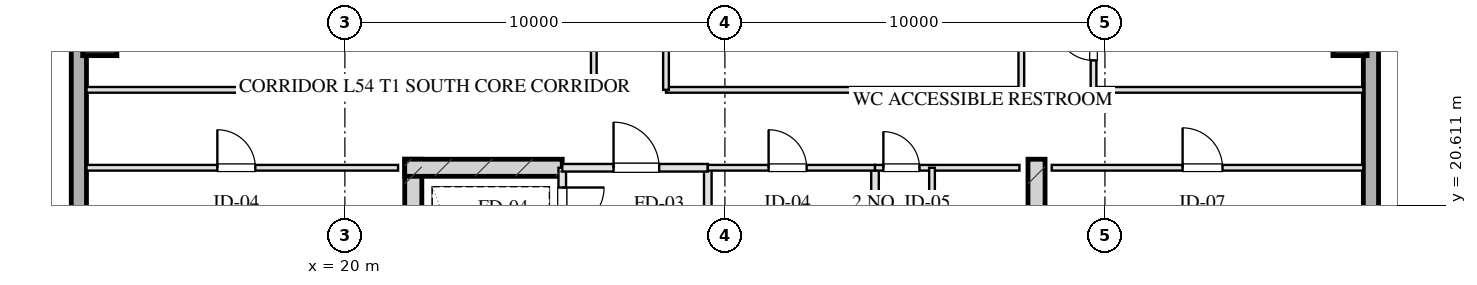
"""IFC4 building model, lengths in metres.
Left out: names, types, materials, properties, quantities, classifications, styles, units other than length and angle.
Written with IfcOpenShell. Run it as: python <this file> out.ifc"""

import sys

from ifc_helpers import new_model, si_unit, direction, frame, frame_2d, origin, origin_2d, place, context, subcontext, project, spatial, rectangle, hollow_rectangle, extrude, element, fill, save


model = new_model("IFC4")
c1 = context("Model", 3, precision=1e-05, world=origin(), true_north=direction((0.0, 1.0)))
c2 = subcontext(c1, "Body", "Model", "MODEL_VIEW")
j1 = project(units=[si_unit("LENGTHUNIT", "METRE"), si_unit("PLANEANGLEUNIT", "RADIAN")], contexts=[c1])
p1 = place(None, origin())
s1 = spatial("IfcSite", under=j1, at=p1, CompositionType="ELEMENT")
p2 = place(p1, origin())
s2 = spatial("IfcBuilding", under=s1, at=p2, CompositionType="ELEMENT")
p3 = place(p2, frame((0.0, 0.0, 202.4)))
s3 = spatial("IfcBuildingStorey", under=s2, at=p3, CompositionType="ELEMENT", Elevation=202.4)
for number, where, z_axis, x_axis in (
    (1, (21.8, 21.825, 0.0), (0.0, 0.0, 1.0), (0.0, -1.0, 0.0)),
    (2, (38.2, 21.825, 0.0), (0.0, 0.0, 1.0), (0.0, -1.0, 0.0)),
):
    element("IfcWall", number, at=place(p3, frame(where, z_axis=z_axis, x_axis=x_axis)), inside=s3, PredefinedType="SHEAR", context=c2, shape_type="SweptSolid", body=[
        extrude(rectangle(XDim=9.33, YDim=0.45, at=frame_2d((4.665, 0.0))), origin(), (0.0, 0.0, 1.0), 3.45),
    ])
p4 = place(p3, frame((21.575, 21.6, 0.0), z_axis=(0.0, 0.0, 1.0), x_axis=(1.0, 0.0, 0.0)))
e3 = element("IfcWall", 3, at=p4, inside=s3, PredefinedType="SHEAR", context=c2, shape_type="SweptSolid", body=[
    extrude(rectangle(XDim=4.145, YDim=0.45, at=frame_2d((2.073, 0.0))), origin(), (0.0, 0.0, 1.0), 3.45),
])
for number, where, z_axis, x_axis in (
    (4, (13.55, 25.0, 0.0), (0.0, 0.0, 1.0), (1.0, 0.0, 0.0)),
    (5, (46.45, 25.0, 0.0), (0.0, 0.0, 1.0), (1.0, 0.0, 0.0)),
):
    element("IfcColumn", number, at=place(p3, frame(where, z_axis=z_axis, x_axis=x_axis)), inside=s3, PredefinedType="COLUMN", context=c2, shape_type="SweptSolid", body=[
        extrude(hollow_rectangle(XDim=0.9, YDim=0.9, WallThickness=0.032, at=origin_2d()), origin(), (0.0, 0.0, 1.0), 3.451),
    ])
p5 = place(p3, frame((13.0, 10.8, 0.0), z_axis=(0.0, 0.0, 1.0), x_axis=(0.0, 1.0, 0.0)))
e6 = element("IfcWall", 6, at=p5, inside=s3, PredefinedType="SOLIDWALL", context=c2, shape_type="SweptSolid", body=[
    extrude(rectangle(XDim=46.4, YDim=0.4, at=frame_2d((23.2, 0.0))), origin(), (0.0, 0.0, 1.0), 2.61),
])
p6 = place(p5, frame((15.75, 0.0, 0.75)))
e7 = element("IfcOpeningElement", 7, at=p6, cuts=e6, PredefinedType="OPENING", context=c2, shape_type="SweptSolid", body=[
    extrude(rectangle(XDim=2.1, YDim=1.46, at=frame_2d((1.05, 0.73))), frame((0.0, 0.21, 0.0), z_axis=(0.0, -1.0, 0.0), x_axis=(1.0, 0.0, 0.0)), (0.0, 0.0, 1.0), 0.42),
])
p7 = place(p5, frame((19.55, 0.0, 0.75)))
e8 = element("IfcOpeningElement", 8, at=p7, cuts=e6, PredefinedType="OPENING", context=c2, shape_type="SweptSolid", body=[
    extrude(rectangle(XDim=2.1, YDim=1.46, at=frame_2d((1.05, 0.73))), frame((0.0, 0.21, 0.0), z_axis=(0.0, -1.0, 0.0), x_axis=(1.0, 0.0, 0.0)), (0.0, 0.0, 1.0), 0.42),
])
p8 = place(p5, frame((24.75, 0.0, 0.75)))
e9 = element("IfcOpeningElement", 9, at=p8, cuts=e6, PredefinedType="OPENING", context=c2, shape_type="SweptSolid", body=[
    extrude(rectangle(XDim=2.1, YDim=1.46, at=frame_2d((1.05, 0.73))), frame((0.0, 0.21, 0.0), z_axis=(0.0, -1.0, 0.0), x_axis=(1.0, 0.0, 0.0)), (0.0, 0.0, 1.0), 0.42),
])
p9 = place(p5, frame((28.55, 0.0, 0.75)))
e10 = element("IfcOpeningElement", 10, at=p9, cuts=e6, PredefinedType="OPENING", context=c2, shape_type="SweptSolid", body=[
    extrude(rectangle(XDim=2.1, YDim=1.46, at=frame_2d((1.05, 0.73))), frame((0.0, 0.21, 0.0), z_axis=(0.0, -1.0, 0.0), x_axis=(1.0, 0.0, 0.0)), (0.0, 0.0, 1.0), 0.42),
])
p10 = place(p3, frame((47.0, 57.2, 0.0), z_axis=(0.0, 0.0, 1.0), x_axis=(0.0, -1.0, 0.0)))
e11 = element("IfcWall", 11, at=p10, inside=s3, PredefinedType="SOLIDWALL", context=c2, shape_type="SweptSolid", body=[
    extrude(rectangle(XDim=46.4, YDim=0.4, at=frame_2d((23.2, 0.0))), origin(), (0.0, 0.0, 1.0), 2.61),
])
p11 = place(p10, frame((28.55, 0.0, 0.75)))
e12 = element("IfcOpeningElement", 12, at=p11, cuts=e11, PredefinedType="OPENING", context=c2, shape_type="SweptSolid", body=[
    extrude(rectangle(XDim=2.1, YDim=1.46, at=frame_2d((1.05, 0.73))), frame((0.0, 0.21, 0.0), z_axis=(0.0, -1.0, 0.0), x_axis=(1.0, 0.0, 0.0)), (0.0, 0.0, 1.0), 0.42),
])
p12 = place(p10, frame((24.75, 0.0, 0.75)))
e13 = element("IfcOpeningElement", 13, at=p12, cuts=e11, PredefinedType="OPENING", context=c2, shape_type="SweptSolid", body=[
    extrude(rectangle(XDim=2.1, YDim=1.46, at=frame_2d((1.05, 0.73))), frame((0.0, 0.21, 0.0), z_axis=(0.0, -1.0, 0.0), x_axis=(1.0, 0.0, 0.0)), (0.0, 0.0, 1.0), 0.42),
])
p13 = place(p10, frame((19.55, 0.0, 0.75)))
e14 = element("IfcOpeningElement", 14, at=p13, cuts=e11, PredefinedType="OPENING", context=c2, shape_type="SweptSolid", body=[
    extrude(rectangle(XDim=2.1, YDim=1.46, at=frame_2d((1.05, 0.73))), frame((0.0, 0.21, 0.0), z_axis=(0.0, -1.0, 0.0), x_axis=(1.0, 0.0, 0.0)), (0.0, 0.0, 1.0), 0.42),
])
p14 = place(p10, frame((15.75, 0.0, 0.75)))
e15 = element("IfcOpeningElement", 15, at=p14, cuts=e11, PredefinedType="OPENING", context=c2, shape_type="SweptSolid", body=[
    extrude(rectangle(XDim=2.1, YDim=1.46, at=frame_2d((1.05, 0.73))), frame((0.0, 0.21, 0.0), z_axis=(0.0, -1.0, 0.0), x_axis=(1.0, 0.0, 0.0)), (0.0, 0.0, 1.0), 0.42),
])
p15 = place(p3, frame((25.72, 21.6, 0.0), z_axis=(0.0, 0.0, 1.0), x_axis=(0.0, -1.0, 0.0)))
e16 = element("IfcWall", 16, at=p15, inside=s3, PredefinedType="PARTITIONING", context=c2, shape_type="SweptSolid", body=[
    extrude(rectangle(XDim=1.9, YDim=0.2, at=frame_2d((0.95, 0.0))), origin(), (0.0, 0.0, 1.0), 3.175),
])
p16 = place(p15, frame((0.52, 0.0, 0.0)))
e17 = element("IfcOpeningElement", 17, at=p16, cuts=e16, PredefinedType="OPENING", context=c2, shape_type="SweptSolid", body=[
    extrude(rectangle(XDim=1.1, YDim=2.05, at=frame_2d((0.55, 1.025))), frame((0.0, 0.11, 0.0), z_axis=(0.0, -1.0, 0.0), x_axis=(1.0, 0.0, 0.0)), (0.0, 0.0, 1.0), 0.22),
])
p17 = place(p3, frame((29.55, 21.6, 0.0), z_axis=(0.0, 0.0, 1.0), x_axis=(0.0, -1.0, 0.0)))
e18 = element("IfcWall", 18, at=p17, inside=s3, PredefinedType="PARTITIONING", context=c2, shape_type="SweptSolid", body=[
    extrude(rectangle(XDim=8.43, YDim=0.2, at=frame_2d((4.215, 0.0))), origin(), (0.0, 0.0, 1.0), 3.175),
])
p18 = place(p3, frame((25.72, 21.6, 0.0), z_axis=(0.0, 0.0, 1.0), x_axis=(1.0, 0.0, 0.0)))
e19 = element("IfcWall", 19, at=p18, inside=s3, PredefinedType="PARTITIONING", context=c2, shape_type="SweptSolid", body=[
    extrude(rectangle(XDim=3.83, YDim=0.2, at=frame_2d((1.915, 0.0))), origin(), (0.0, 0.0, 1.0), 3.175),
])
p19 = place(p18, frame((1.35, 0.0, 0.0)))
e20 = element("IfcOpeningElement", 20, at=p19, cuts=e19, PredefinedType="OPENING", context=c2, shape_type="SweptSolid", body=[
    extrude(rectangle(XDim=1.2, YDim=2.05, at=frame_2d((0.6, 1.025))), frame((0.0, 0.11, 0.0), z_axis=(0.0, -1.0, 0.0), x_axis=(1.0, 0.0, 0.0)), (0.0, 0.0, 1.0), 0.22),
])
p20 = place(p3, frame((33.95, 21.6, 0.0), z_axis=(0.0, 0.0, 1.0), x_axis=(0.0, -1.0, 0.0)))
e21 = element("IfcWall", 21, at=p20, inside=s3, PredefinedType="PARTITIONING", context=c2, shape_type="SweptSolid", body=[
    extrude(rectangle(XDim=8.43, YDim=0.2, at=frame_2d((4.215, 0.0))), origin(), (0.0, 0.0, 1.0), 3.175),
])
p21 = place(p3, frame((29.55, 21.6, 0.0), z_axis=(0.0, 0.0, 1.0), x_axis=(1.0, 0.0, 0.0)))
e22 = element("IfcWall", 22, at=p21, inside=s3, PredefinedType="PARTITIONING", context=c2, shape_type="SweptSolid", body=[
    extrude(rectangle(XDim=4.4, YDim=0.15, at=frame_2d((2.2, 0.0))), origin(), (0.0, 0.0, 1.0), 3.175),
])
p22 = place(p21, frame((1.6, 0.0, 0.0)))
e23 = element("IfcOpeningElement", 23, at=p22, cuts=e22, PredefinedType="OPENING", context=c2, shape_type="SweptSolid", body=[
    extrude(rectangle(XDim=1.0, YDim=2.05, at=frame_2d((0.5, 1.025))), frame((0.0, 0.085, 0.0), z_axis=(0.0, -1.0, 0.0), x_axis=(1.0, 0.0, 0.0)), (0.0, 0.0, 1.0), 0.17),
])
p23 = place(p3, frame((33.95, 21.6, 0.0), z_axis=(0.0, 0.0, 1.0), x_axis=(1.0, 0.0, 0.0)))
e24 = element("IfcWall", 24, at=p23, inside=s3, PredefinedType="PARTITIONING", context=c2, shape_type="SweptSolid", body=[
    extrude(rectangle(XDim=3.8, YDim=0.15, at=frame_2d((1.9, 0.0))), origin(), (0.0, 0.0, 1.0), 3.175),
])
p24 = place(p23, frame((0.22, 0.0, 0.0)))
e25 = element("IfcOpeningElement", 25, at=p24, cuts=e24, PredefinedType="OPENING", context=c2, shape_type="SweptSolid", body=[
    extrude(rectangle(XDim=0.95, YDim=2.05, at=frame_2d((0.475, 1.025))), frame((0.0, 0.085, 0.0), z_axis=(0.0, -1.0, 0.0), x_axis=(1.0, 0.0, 0.0)), (0.0, 0.0, 1.0), 0.17),
])
p25 = place(p3, frame((35.45, 21.6, 0.0), z_axis=(0.0, 0.0, 1.0), x_axis=(0.0, -1.0, 0.0)))
e26 = element("IfcWall", 26, at=p25, inside=s3, PredefinedType="PARTITIONING", context=c2, shape_type="SweptSolid", body=[
    extrude(rectangle(XDim=8.43, YDim=0.15, at=frame_2d((4.215, 0.0))), origin(), (0.0, 0.0, 1.0), 2.765),
])
p26 = place(p25, frame((2.55, 0.0, 0.0)))
e27 = element("IfcOpeningElement", 27, at=p26, cuts=e26, PredefinedType="OPENING", context=c2, shape_type="SweptSolid", body=[
    extrude(rectangle(XDim=0.95, YDim=2.05, at=frame_2d((0.475, 1.025))), frame((0.0, 0.085, 0.0), z_axis=(0.0, -1.0, 0.0), x_axis=(1.0, 0.0, 0.0)), (0.0, 0.0, 1.0), 0.17),
])
p27 = place(p25, frame((5.8, 0.0, 0.0)))
e28 = element("IfcOpeningElement", 28, at=p27, cuts=e26, PredefinedType="OPENING", context=c2, shape_type="SweptSolid", body=[
    extrude(rectangle(XDim=0.9, YDim=2.05, at=frame_2d((0.45, 1.025))), frame((0.0, 0.085, 0.0), z_axis=(0.0, -1.0, 0.0), x_axis=(1.0, 0.0, 0.0)), (0.0, 0.0, 1.0), 0.17),
])
p28 = place(p3, frame((13.2, 21.6, 0.0), z_axis=(0.0, 0.0, 1.0), x_axis=(1.0, 0.0, 0.0)))
e29 = element("IfcWall", 29, at=p28, inside=s3, PredefinedType="PARTITIONING", context=c2, shape_type="SweptSolid", body=[
    extrude(rectangle(XDim=8.2, YDim=0.15, at=frame_2d((4.1, 0.0))), origin(), (0.0, 0.0, 1.0), 3.175),
])
p29 = place(p28, frame((3.444, 0.0, 0.0)))
e30 = element("IfcOpeningElement", 30, at=p29, cuts=e29, PredefinedType="OPENING", context=c2, shape_type="SweptSolid", body=[
    extrude(rectangle(XDim=1.0, YDim=2.05, at=frame_2d((0.5, 1.025))), frame((0.0, 0.085, 0.0), z_axis=(0.0, -1.0, 0.0), x_axis=(1.0, 0.0, 0.0)), (0.0, 0.0, 1.0), 0.17),
])
p30 = place(p3, frame((38.6, 21.6, 0.0), z_axis=(0.0, 0.0, 1.0), x_axis=(1.0, 0.0, 0.0)))
e31 = element("IfcWall", 31, at=p30, inside=s3, PredefinedType="PARTITIONING", context=c2, shape_type="SweptSolid", body=[
    extrude(rectangle(XDim=8.2, YDim=0.15, at=frame_2d((4.1, 0.0))), origin(), (0.0, 0.0, 1.0), 3.175),
])
p31 = place(p30, frame((3.444, 0.0, 0.0)))
e32 = element("IfcOpeningElement", 32, at=p31, cuts=e31, PredefinedType="OPENING", context=c2, shape_type="SweptSolid", body=[
    extrude(rectangle(XDim=1.05, YDim=2.05, at=frame_2d((0.525, 1.025))), frame((0.0, 0.085, 0.0), z_axis=(0.0, -1.0, 0.0), x_axis=(1.0, 0.0, 0.0)), (0.0, 0.0, 1.0), 0.17),
])
p32 = place(p3, frame((13.2, 23.65, 0.0), z_axis=(0.0, 0.0, 1.0), x_axis=(1.0, 0.0, 0.0)))
e33 = element("IfcWall", 33, at=p32, inside=s3, PredefinedType="PARTITIONING", context=c2, shape_type="SweptSolid", body=[
    extrude(rectangle(XDim=13.35, YDim=0.15, at=frame_2d((6.675, 0.0))), origin(), (0.0, 0.0, 1.0), 3.175),
])
p33 = place(p3, frame((28.45, 23.65, 0.0), z_axis=(0.0, 0.0, 1.0), x_axis=(1.0, 0.0, 0.0)))
e34 = element("IfcWall", 34, at=p33, inside=s3, PredefinedType="PARTITIONING", context=c2, shape_type="SweptSolid", body=[
    extrude(rectangle(XDim=9.35, YDim=0.15, at=frame_2d((4.675, 0.0))), origin(), (0.0, 0.0, 1.0), 3.175),
])
p34 = place(p3, frame((39.7, 23.65, 0.0), z_axis=(0.0, 0.0, 1.0), x_axis=(1.0, 0.0, 0.0)))
e35 = element("IfcWall", 35, at=p34, inside=s3, PredefinedType="PARTITIONING", context=c2, shape_type="SweptSolid", body=[
    extrude(rectangle(XDim=7.1, YDim=0.15, at=frame_2d((3.55, 0.0))), origin(), (0.0, 0.0, 1.0), 3.175),
])
p35 = place(p3, frame((26.55, 23.65, 0.0), z_axis=(0.0, 0.0, 1.0), x_axis=(0.0, 1.0, 0.0)))
e36 = element("IfcWall", 36, at=p35, inside=s3, PredefinedType="PARTITIONING", context=c2, shape_type="SweptSolid", body=[
    extrude(rectangle(XDim=20.7, YDim=0.15, at=frame_2d((10.35, 0.0))), origin(), (0.0, 0.0, 1.0), 3.175),
])
p36 = place(p35, frame((4.075, 0.0, 0.0)))
e37 = element("IfcOpeningElement", 37, at=p36, cuts=e36, PredefinedType="OPENING", context=c2, shape_type="SweptSolid", body=[
    extrude(rectangle(XDim=1.0, YDim=2.05, at=frame_2d((0.5, 1.025))), frame((0.0, 0.085, 0.0), z_axis=(0.0, -1.0, 0.0), x_axis=(1.0, 0.0, 0.0)), (0.0, 0.0, 1.0), 0.17),
])
p37 = place(p35, frame((14.425, 0.0, 0.0)))
e38 = element("IfcOpeningElement", 38, at=p37, cuts=e36, PredefinedType="OPENING", context=c2, shape_type="SweptSolid", body=[
    extrude(rectangle(XDim=1.0, YDim=2.05, at=frame_2d((0.5, 1.025))), frame((0.0, 0.085, 0.0), z_axis=(0.0, -1.0, 0.0), x_axis=(1.0, 0.0, 0.0)), (0.0, 0.0, 1.0), 0.17),
])
p38 = place(p3, frame((28.45, 23.65, 0.0), z_axis=(0.0, 0.0, 1.0), x_axis=(0.0, 1.0, 0.0)))
e39 = element("IfcWall", 39, at=p38, inside=s3, PredefinedType="PARTITIONING", context=c2, shape_type="SweptSolid", body=[
    extrude(rectangle(XDim=20.7, YDim=0.15, at=frame_2d((10.35, 0.0))), origin(), (0.0, 0.0, 1.0), 3.175),
])
p39 = place(p38, frame((9.936, 0.0, 0.0)))
e40 = element("IfcOpeningElement", 40, at=p39, cuts=e39, PredefinedType="OPENING", context=c2, shape_type="SweptSolid", body=[
    extrude(rectangle(XDim=1.1, YDim=2.05, at=frame_2d((0.55, 1.025))), frame((0.0, 0.085, 0.0), z_axis=(0.0, -1.0, 0.0), x_axis=(1.0, 0.0, 0.0)), (0.0, 0.0, 1.0), 0.17),
])
p40 = place(p3, frame((37.8, 23.65, 0.0), z_axis=(0.0, 0.0, 1.0), x_axis=(0.0, 1.0, 0.0)))
e41 = element("IfcWall", 41, at=p40, inside=s3, PredefinedType="PARTITIONING", context=c2, shape_type="SweptSolid", body=[
    extrude(rectangle(XDim=20.7, YDim=0.15, at=frame_2d((10.35, 0.0))), origin(), (0.0, 0.0, 1.0), 3.175),
])
p41 = place(p3, frame((39.7, 23.65, 0.0), z_axis=(0.0, 0.0, 1.0), x_axis=(0.0, 1.0, 0.0)))
e42 = element("IfcWall", 42, at=p41, inside=s3, PredefinedType="PARTITIONING", context=c2, shape_type="SweptSolid", body=[
    extrude(rectangle(XDim=20.7, YDim=0.15, at=frame_2d((10.35, 0.0))), origin(), (0.0, 0.0, 1.0), 3.175),
])
p42 = place(p41, frame((0.775, 0.0, 0.0)))
e43 = element("IfcOpeningElement", 43, at=p42, cuts=e42, PredefinedType="OPENING", context=c2, shape_type="SweptSolid", body=[
    extrude(rectangle(XDim=1.0, YDim=2.05, at=frame_2d((0.5, 1.025))), frame((0.0, 0.085, 0.0), z_axis=(0.0, -1.0, 0.0), x_axis=(1.0, 0.0, 0.0)), (0.0, 0.0, 1.0), 0.17),
])
p43 = place(p41, frame((3.95, 0.0, 0.0)))
e44 = element("IfcOpeningElement", 44, at=p43, cuts=e42, PredefinedType="OPENING", context=c2, shape_type="SweptSolid", body=[
    extrude(rectangle(XDim=1.05, YDim=2.05, at=frame_2d((0.525, 1.025))), frame((0.0, 0.085, 0.0), z_axis=(0.0, -1.0, 0.0), x_axis=(1.0, 0.0, 0.0)), (0.0, 0.0, 1.0), 0.17),
])
p44 = place(p41, frame((8.19, 0.0, 0.0)))
e45 = element("IfcOpeningElement", 45, at=p44, cuts=e42, PredefinedType="OPENING", context=c2, shape_type="SweptSolid", body=[
    extrude(rectangle(XDim=1.0, YDim=2.05, at=frame_2d((0.5, 1.025))), frame((0.0, 0.085, 0.0), z_axis=(0.0, -1.0, 0.0), x_axis=(1.0, 0.0, 0.0)), (0.0, 0.0, 1.0), 0.17),
])
p45 = place(p41, frame((12.373, 0.0, 0.0)))
e46 = element("IfcOpeningElement", 46, at=p45, cuts=e42, PredefinedType="OPENING", context=c2, shape_type="SweptSolid", body=[
    extrude(rectangle(XDim=1.0, YDim=2.05, at=frame_2d((0.5, 1.025))), frame((0.0, 0.085, 0.0), z_axis=(0.0, -1.0, 0.0), x_axis=(1.0, 0.0, 0.0)), (0.0, 0.0, 1.0), 0.17),
])
p46 = place(p41, frame((15.933, 0.0, 0.0)))
e47 = element("IfcOpeningElement", 47, at=p46, cuts=e42, PredefinedType="OPENING", context=c2, shape_type="SweptSolid", body=[
    extrude(rectangle(XDim=1.0, YDim=2.05, at=frame_2d((0.5, 1.025))), frame((0.0, 0.085, 0.0), z_axis=(0.0, -1.0, 0.0), x_axis=(1.0, 0.0, 0.0)), (0.0, 0.0, 1.0), 0.17),
])
p47 = place(p41, frame((18.925, 0.0, 0.0)))
e48 = element("IfcOpeningElement", 48, at=p47, cuts=e42, PredefinedType="OPENING", context=c2, shape_type="SweptSolid", body=[
    extrude(rectangle(XDim=1.0, YDim=2.05, at=frame_2d((0.5, 1.025))), frame((0.0, 0.085, 0.0), z_axis=(0.0, -1.0, 0.0), x_axis=(1.0, 0.0, 0.0)), (0.0, 0.0, 1.0), 0.17),
])
p48 = place(p16, origin())
e49 = element("IfcDoor", 49, at=p48, inside=s3, OperationType="SINGLE_SWING_LEFT", PredefinedType="DOOR", context=c2, shape_type="SweptSolid", body=[
    extrude(rectangle(XDim=1.1, YDim=2.05, at=frame_2d((0.55, 1.025))), frame((0.0, 0.025, 0.0), z_axis=(0.0, -1.0, 0.0), x_axis=(1.0, 0.0, 0.0)), (0.0, 0.0, 1.0), 0.05),
])
fill(e17, e49)
p49 = place(p19, origin())
e50 = element("IfcDoor", 50, at=p49, inside=s3, OperationType="SINGLE_SWING_LEFT", PredefinedType="DOOR", context=c2, shape_type="SweptSolid", body=[
    extrude(rectangle(XDim=1.2, YDim=2.05, at=frame_2d((0.6, 1.025))), frame((0.0, 0.025, 0.0), z_axis=(0.0, -1.0, 0.0), x_axis=(1.0, 0.0, 0.0)), (0.0, 0.0, 1.0), 0.05),
])
fill(e20, e50)
p50 = place(p22, origin())
e51 = element("IfcDoor", 51, at=p50, inside=s3, OperationType="SINGLE_SWING_LEFT", PredefinedType="DOOR", context=c2, shape_type="SweptSolid", body=[
    extrude(rectangle(XDim=1.0, YDim=2.05, at=frame_2d((0.5, 1.025))), frame((0.0, 0.025, 0.0), z_axis=(0.0, -1.0, 0.0), x_axis=(1.0, 0.0, 0.0)), (0.0, 0.0, 1.0), 0.05),
])
fill(e23, e51)
p51 = place(p24, origin())
e52 = element("IfcDoor", 52, at=p51, inside=s3, OperationType="SINGLE_SWING_LEFT", PredefinedType="DOOR", context=c2, shape_type="SweptSolid", body=[
    extrude(rectangle(XDim=0.95, YDim=2.05, at=frame_2d((0.475, 1.025))), frame((0.0, 0.025, 0.0), z_axis=(0.0, -1.0, 0.0), x_axis=(1.0, 0.0, 0.0)), (0.0, 0.0, 1.0), 0.05),
])
fill(e25, e52)
p52 = place(p29, origin())
e53 = element("IfcDoor", 53, at=p52, inside=s3, OperationType="SINGLE_SWING_LEFT", PredefinedType="DOOR", context=c2, shape_type="SweptSolid", body=[
    extrude(rectangle(XDim=1.0, YDim=2.05, at=frame_2d((0.5, 1.025))), frame((0.0, 0.025, 0.0), z_axis=(0.0, -1.0, 0.0), x_axis=(1.0, 0.0, 0.0)), (0.0, 0.0, 1.0), 0.05),
])
fill(e30, e53)
p53 = place(p31, origin())
e54 = element("IfcDoor", 54, at=p53, inside=s3, OperationType="SINGLE_SWING_LEFT", PredefinedType="DOOR", context=c2, shape_type="SweptSolid", body=[
    extrude(rectangle(XDim=1.05, YDim=2.05, at=frame_2d((0.525, 1.025))), frame((0.0, 0.025, 0.0), z_axis=(0.0, -1.0, 0.0), x_axis=(1.0, 0.0, 0.0)), (0.0, 0.0, 1.0), 0.05),
])
fill(e32, e54)
p54 = place(p42, origin())
e55 = element("IfcDoor", 55, at=p54, inside=s3, OperationType="SINGLE_SWING_RIGHT", PredefinedType="DOOR", context=c2, shape_type="SweptSolid", body=[
    extrude(rectangle(XDim=1.0, YDim=2.05, at=frame_2d((0.5, 1.025))), frame((0.0, 0.025, 0.0), z_axis=(0.0, -1.0, 0.0), x_axis=(1.0, 0.0, 0.0)), (0.0, 0.0, 1.0), 0.05),
])
fill(e43, e55)
save(model, sys.argv[1])
